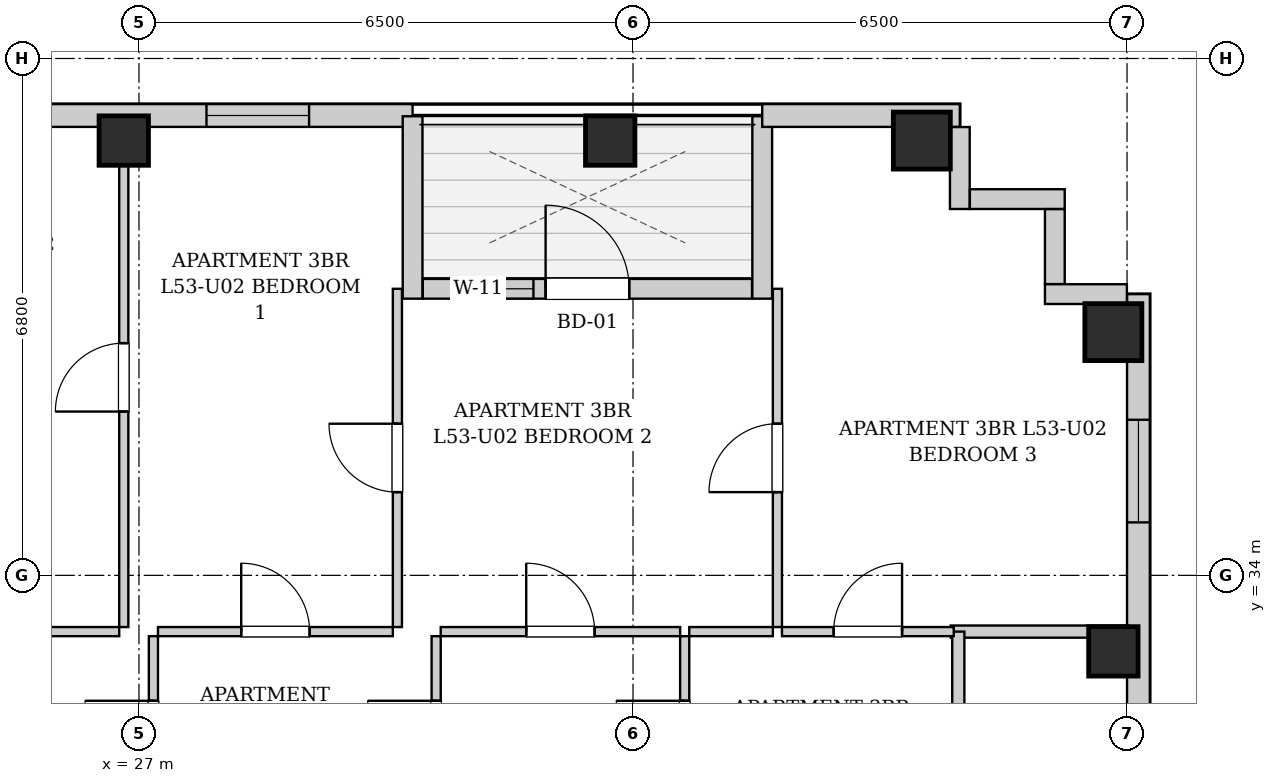
"""IFC4 building model, lengths in metres.
Left out: names, types, materials, properties, quantities, classifications, styles, units other than length and angle.
Written with IfcOpenShell. Run it as: python <this file> out.ifc"""

import sys

from ifc_helpers import new_model, si_unit, direction, frame, frame_2d, origin, origin_2d, place, context, subcontext, project, spatial, rectangle, extrude, element, fill, save


model = new_model("IFC4")
c1 = context("Model", 3, precision=1e-05, world=origin(), true_north=direction((0.0, 1.0)))
c2 = subcontext(c1, "Body", "Model", "MODEL_VIEW")
j1 = project(units=[si_unit("LENGTHUNIT", "METRE"), si_unit("PLANEANGLEUNIT", "RADIAN")], contexts=[c1])
p1 = place(None, origin())
s1 = spatial("IfcSite", under=j1, at=p1, CompositionType="ELEMENT")
p2 = place(p1, origin())
s2 = spatial("IfcBuilding", under=s1, at=p2, CompositionType="ELEMENT")
p3 = place(p2, frame((0.0, 0.0, 184.3)))
s3 = spatial("IfcBuildingStorey", under=s2, at=p3, CompositionType="ELEMENT", Elevation=184.3)
for number, where, z_axis, x_axis in (
    (1, (26.8, 39.72, 0.0), (0.0, 0.0, 1.0), (1.0, 0.0, 0.0)),
    (2, (33.2, 39.72, 0.0), (0.0, 0.0, 1.0), (1.0, 0.0, 0.0)),
):
    element("IfcColumn", number, at=place(p3, frame(where, z_axis=z_axis, x_axis=x_axis)), inside=s3, PredefinedType="COLUMN", context=c2, shape_type="SweptSolid", body=[
        extrude(rectangle(XDim=0.65, YDim=0.65, at=origin_2d()), origin(), (0.0, 0.0, 1.0), 3.3),
    ])
p4 = place(p3, frame((37.3, 39.72, 0.0), z_axis=(0.0, 0.0, 1.0), x_axis=(1.0, 0.0, 0.0)))
e3 = element("IfcColumn", 3, at=p4, inside=s3, PredefinedType="COLUMN", context=c2, shape_type="SweptSolid", body=[
    extrude(rectangle(XDim=0.75, YDim=0.75, at=origin_2d()), origin(), (0.0, 0.0, 1.0), 3.3),
])
p5 = place(p3, frame((39.82, 33.0, 0.0), z_axis=(0.0, 0.0, 1.0), x_axis=(1.0, 0.0, 0.0)))
e4 = element("IfcColumn", 4, at=p5, inside=s3, PredefinedType="COLUMN", context=c2, shape_type="SweptSolid", body=[
    extrude(rectangle(XDim=0.65, YDim=0.65, at=origin_2d()), origin(), (0.0, 0.0, 1.0), 3.3),
])
p6 = place(p3, frame((39.82, 37.2, 0.0), z_axis=(0.0, 0.0, 1.0), x_axis=(1.0, 0.0, 0.0)))
e5 = element("IfcColumn", 5, at=p6, inside=s3, PredefinedType="COLUMN", context=c2, shape_type="SweptSolid", body=[
    extrude(rectangle(XDim=0.75, YDim=0.75, at=origin_2d()), origin(), (0.0, 0.0, 1.0), 3.3),
])
p7 = place(p3, frame((13.1, 40.05, 0.0), z_axis=(0.0, 0.0, 1.0), x_axis=(1.0, 0.0, 0.0)))
e6 = element("IfcWall", 6, at=p7, inside=s3, PredefinedType="SOLIDWALL", context=c2, shape_type="SweptSolid", body=[
    extrude(rectangle(XDim=17.5, YDim=0.3, at=frame_2d((8.75, 0.0))), origin(), (0.0, 0.0, 1.0), 3.04),
])
p8 = place(p7, frame((1.815, 0.0, 0.55)))
e7 = element("IfcOpeningElement", 7, at=p8, cuts=e6, PredefinedType="OPENING", context=c2, shape_type="SweptSolid", body=[
    extrude(rectangle(XDim=1.35, YDim=1.2, at=frame_2d((0.675, 0.6))), frame((0.0, 0.16, 0.0), z_axis=(0.0, -1.0, 0.0), x_axis=(1.0, 0.0, 0.0)), (0.0, 0.0, 1.0), 0.32),
])
p9 = place(p7, frame((6.189, 0.0, 0.55)))
e8 = element("IfcOpeningElement", 8, at=p9, cuts=e6, PredefinedType="OPENING", context=c2, shape_type="SweptSolid", body=[
    extrude(rectangle(XDim=1.35, YDim=1.2, at=frame_2d((0.675, 0.6))), frame((0.0, 0.16, 0.0), z_axis=(0.0, -1.0, 0.0), x_axis=(1.0, 0.0, 0.0)), (0.0, 0.0, 1.0), 0.32),
])
p10 = place(p7, frame((14.788, 0.0, 0.55)))
e9 = element("IfcOpeningElement", 9, at=p10, cuts=e6, PredefinedType="OPENING", context=c2, shape_type="SweptSolid", body=[
    extrude(rectangle(XDim=1.35, YDim=1.2, at=frame_2d((0.675, 0.6))), frame((0.0, 0.16, 0.0), z_axis=(0.0, -1.0, 0.0), x_axis=(1.0, 0.0, 0.0)), (0.0, 0.0, 1.0), 0.32),
])
p11 = place(p3, frame((30.6, 40.04, 0.0), z_axis=(0.0, 0.0, 1.0), x_axis=(0.0, -1.0, 0.0)))
e10 = element("IfcWall", 10, at=p11, inside=s3, PredefinedType="SOLIDWALL", context=c2, shape_type="SweptSolid", body=[
    extrude(rectangle(XDim=2.4, YDim=0.26, at=frame_2d((1.2, 0.0))), origin(), (0.0, 0.0, 1.0), 3.04),
])
p12 = place(p3, frame((30.734, 37.77, 0.0), z_axis=(0.0, 0.0, 1.0), x_axis=(1.0, 0.0, 0.0)))
e11 = element("IfcWall", 11, at=p12, inside=s3, PredefinedType="SOLIDWALL", context=c2, shape_type="SweptSolid", body=[
    extrude(rectangle(XDim=4.332, YDim=0.26, at=frame_2d((2.166, 0.0))), origin(), (0.0, 0.0, 1.0), 3.04),
])
p13 = place(p12, frame((1.616, 0.0, 0.0)))
e12 = element("IfcOpeningElement", 12, at=p13, cuts=e11, PredefinedType="OPENING", context=c2, shape_type="SweptSolid", body=[
    extrude(rectangle(XDim=1.1, YDim=2.0, at=frame_2d((0.55, 1.0))), frame((0.0, 0.14, 0.0), z_axis=(0.0, -1.0, 0.0), x_axis=(1.0, 0.0, 0.0)), (0.0, 0.0, 1.0), 0.28),
])
p14 = place(p12, frame((0.606, 0.0, 0.55)))
e13 = element("IfcOpeningElement", 13, at=p14, cuts=e11, PredefinedType="OPENING", context=c2, shape_type="SweptSolid", body=[
    extrude(rectangle(XDim=0.85, YDim=1.2, at=frame_2d((0.425, 0.6))), frame((0.0, 0.14, 0.0), z_axis=(0.0, -1.0, 0.0), x_axis=(1.0, 0.0, 0.0)), (0.0, 0.0, 1.0), 0.28),
])
p15 = place(p3, frame((35.2, 37.64, 0.0), z_axis=(0.0, 0.0, 1.0), x_axis=(0.0, 1.0, 0.0)))
e14 = element("IfcWall", 14, at=p15, inside=s3, PredefinedType="SOLIDWALL", context=c2, shape_type="SweptSolid", body=[
    extrude(rectangle(XDim=2.4, YDim=0.26, at=frame_2d((1.2, 0.0))), origin(), (0.0, 0.0, 1.0), 3.04),
])
p16 = place(p3, frame((35.2, 40.05, 0.0), z_axis=(0.0, 0.0, 1.0), x_axis=(1.0, 0.0, 0.0)))
e15 = element("IfcWall", 15, at=p16, inside=s3, PredefinedType="SOLIDWALL", context=c2, shape_type="SweptSolid", body=[
    extrude(rectangle(XDim=2.6, YDim=0.3, at=frame_2d((1.3, 0.0))), origin(), (0.0, 0.0, 1.0), 3.04),
])
p17 = place(p3, frame((40.15, 37.7, 0.0), z_axis=(0.0, 0.0, 1.0), x_axis=(0.0, -1.0, 0.0)))
e16 = element("IfcWall", 16, at=p17, inside=s3, PredefinedType="SOLIDWALL", context=c2, shape_type="SweptSolid", body=[
    extrude(rectangle(XDim=31.4, YDim=0.3, at=frame_2d((15.7, 0.0))), origin(), (0.0, 0.0, 1.0), 3.04),
])
p18 = place(p17, frame((28.396, 0.0, 0.55)))
e17 = element("IfcOpeningElement", 17, at=p18, cuts=e16, PredefinedType="OPENING", context=c2, shape_type="SweptSolid", body=[
    extrude(rectangle(XDim=1.35, YDim=1.2, at=frame_2d((0.675, 0.6))), frame((0.0, 0.16, 0.0), z_axis=(0.0, -1.0, 0.0), x_axis=(1.0, 0.0, 0.0)), (0.0, 0.0, 1.0), 0.32),
])
p19 = place(p17, frame((1.653, 0.0, 0.55)))
e18 = element("IfcOpeningElement", 18, at=p19, cuts=e16, PredefinedType="OPENING", context=c2, shape_type="SweptSolid", body=[
    extrude(rectangle(XDim=1.35, YDim=1.2, at=frame_2d((0.675, 0.6))), frame((0.0, 0.16, 0.0), z_axis=(0.0, -1.0, 0.0), x_axis=(1.0, 0.0, 0.0)), (0.0, 0.0, 1.0), 0.32),
])
p20 = place(p17, frame((19.683, 0.0, 0.55)))
e19 = element("IfcOpeningElement", 19, at=p20, cuts=e16, PredefinedType="OPENING", context=c2, shape_type="SweptSolid", body=[
    extrude(rectangle(XDim=1.35, YDim=1.2, at=frame_2d((0.675, 0.6))), frame((0.0, 0.16, 0.0), z_axis=(0.0, -1.0, 0.0), x_axis=(1.0, 0.0, 0.0)), (0.0, 0.0, 1.0), 0.32),
])
p21 = place(p17, frame((10.367, 0.0, 0.55)))
e20 = element("IfcOpeningElement", 20, at=p21, cuts=e16, PredefinedType="OPENING", context=c2, shape_type="SweptSolid", body=[
    extrude(rectangle(XDim=1.35, YDim=1.2, at=frame_2d((0.675, 0.6))), frame((0.0, 0.16, 0.0), z_axis=(0.0, -1.0, 0.0), x_axis=(1.0, 0.0, 0.0)), (0.0, 0.0, 1.0), 0.32),
])
p22 = place(p3, frame((37.8, 39.898, 0.0), z_axis=(0.0, 0.0, 1.0), x_axis=(0.0, -1.0, 0.0)))
e21 = element("IfcWall", 21, at=p22, inside=s3, PredefinedType="SOLIDWALL", context=c2, shape_type="SweptSolid", body=[
    extrude(rectangle(XDim=1.078, YDim=0.26, at=frame_2d((0.539, 0.0))), origin(), (0.0, 0.0, 1.0), 3.04),
])
p23 = place(p3, frame((37.932, 38.95, 0.0), z_axis=(0.0, 0.0, 1.0), x_axis=(1.0, 0.0, 0.0)))
e22 = element("IfcWall", 22, at=p23, inside=s3, PredefinedType="SOLIDWALL", context=c2, shape_type="SweptSolid", body=[
    extrude(rectangle(XDim=1.248, YDim=0.26, at=frame_2d((0.624, 0.0))), origin(), (0.0, 0.0, 1.0), 3.04),
])
p24 = place(p3, frame((39.05, 38.818, 0.0), z_axis=(0.0, 0.0, 1.0), x_axis=(0.0, -1.0, 0.0)))
e23 = element("IfcWall", 23, at=p24, inside=s3, PredefinedType="SOLIDWALL", context=c2, shape_type="SweptSolid", body=[
    extrude(rectangle(XDim=0.986, YDim=0.26, at=frame_2d((0.493, 0.0))), origin(), (0.0, 0.0, 1.0), 3.04),
])
p25 = place(p3, frame((38.92, 37.7, 0.0), z_axis=(0.0, 0.0, 1.0), x_axis=(1.0, 0.0, 0.0)))
e24 = element("IfcWall", 24, at=p25, inside=s3, PredefinedType="SOLIDWALL", context=c2, shape_type="SweptSolid", body=[
    extrude(rectangle(XDim=1.078, YDim=0.26, at=frame_2d((0.539, 0.0))), origin(), (0.0, 0.0, 1.0), 3.04),
])
p26 = place(p3, frame((37.68, 33.26, 0.0), z_axis=(0.0, 0.0, 1.0), x_axis=(1.0, 0.0, 0.0)))
e25 = element("IfcWall", 25, at=p26, inside=s3, PredefinedType="PARTITIONING", context=c2, shape_type="SweptSolid", body=[
    extrude(rectangle(XDim=2.34, YDim=0.16, at=frame_2d((1.17, 0.0))), origin(), (0.0, 0.0, 1.0), 3.04),
])
p27 = place(p3, frame((37.78, 30.6, 0.0), z_axis=(0.0, 0.0, 1.0), x_axis=(0.0, 1.0, 0.0)))
e26 = element("IfcWall", 26, at=p27, inside=s3, PredefinedType="PARTITIONING", context=c2, shape_type="SweptSolid", body=[
    extrude(rectangle(XDim=2.66, YDim=0.16, at=frame_2d((1.33, 0.0))), origin(), (0.0, 0.0, 1.0), 3.04),
])
p28 = place(p3, frame((27.19, 30.6, 0.0), z_axis=(0.0, 0.0, 1.0), x_axis=(0.0, 1.0, 0.0)))
e27 = element("IfcWall", 27, at=p28, inside=s3, PredefinedType="PARTITIONING", context=c2, shape_type="SweptSolid", body=[
    extrude(rectangle(XDim=2.6, YDim=0.12, at=frame_2d((1.3, 0.0))), origin(), (0.0, 0.0, 1.0), 3.04),
])
p29 = place(p28, frame((0.85, 0.0, 0.0)))
e28 = element("IfcOpeningElement", 28, at=p29, cuts=e27, PredefinedType="OPENING", context=c2, shape_type="SweptSolid", body=[
    extrude(rectangle(XDim=0.9, YDim=2.05, at=frame_2d((0.45, 1.025))), frame((0.0, 0.07, 0.0), z_axis=(0.0, -1.0, 0.0), x_axis=(1.0, 0.0, 0.0)), (0.0, 0.0, 1.0), 0.14),
])
p30 = place(p3, frame((23.98, 33.26, 0.0), z_axis=(0.0, 0.0, 1.0), x_axis=(1.0, 0.0, 0.0)))
e29 = element("IfcWall", 29, at=p30, inside=s3, PredefinedType="PARTITIONING", context=c2, shape_type="SweptSolid", body=[
    extrude(rectangle(XDim=2.76, YDim=0.12, at=frame_2d((1.38, 0.0))), origin(), (0.0, 0.0, 1.0), 3.04),
])
p31 = place(p30, frame((0.93, 0.0, 0.0)))
e30 = element("IfcOpeningElement", 30, at=p31, cuts=e29, PredefinedType="OPENING", context=c2, shape_type="SweptSolid", body=[
    extrude(rectangle(XDim=0.9, YDim=2.05, at=frame_2d((0.45, 1.025))), frame((0.0, 0.07, 0.0), z_axis=(0.0, -1.0, 0.0), x_axis=(1.0, 0.0, 0.0)), (0.0, 0.0, 1.0), 0.14),
])
p32 = place(p3, frame((30.91, 30.6, 0.0), z_axis=(0.0, 0.0, 1.0), x_axis=(0.0, 1.0, 0.0)))
e31 = element("IfcWall", 31, at=p32, inside=s3, PredefinedType="PARTITIONING", context=c2, shape_type="SweptSolid", body=[
    extrude(rectangle(XDim=2.6, YDim=0.12, at=frame_2d((1.3, 0.0))), origin(), (0.0, 0.0, 1.0), 3.04),
])
p33 = place(p32, frame((0.85, 0.0, 0.0)))
e32 = element("IfcOpeningElement", 32, at=p33, cuts=e31, PredefinedType="OPENING", context=c2, shape_type="SweptSolid", body=[
    extrude(rectangle(XDim=0.9, YDim=2.05, at=frame_2d((0.45, 1.025))), frame((0.0, 0.07, 0.0), z_axis=(0.0, -1.0, 0.0), x_axis=(1.0, 0.0, 0.0)), (0.0, 0.0, 1.0), 0.14),
])
p34 = place(p3, frame((27.25, 33.26, 0.0), z_axis=(0.0, 0.0, 1.0), x_axis=(1.0, 0.0, 0.0)))
e33 = element("IfcWall", 33, at=p34, inside=s3, PredefinedType="PARTITIONING", context=c2, shape_type="SweptSolid", body=[
    extrude(rectangle(XDim=3.09, YDim=0.12, at=frame_2d((1.545, 0.0))), origin(), (0.0, 0.0, 1.0), 3.04),
])
p35 = place(p34, frame((1.095, 0.0, 0.0)))
e34 = element("IfcOpeningElement", 34, at=p35, cuts=e33, PredefinedType="OPENING", context=c2, shape_type="SweptSolid", body=[
    extrude(rectangle(XDim=0.9, YDim=2.05, at=frame_2d((0.45, 1.025))), frame((0.0, 0.07, 0.0), z_axis=(0.0, -1.0, 0.0), x_axis=(1.0, 0.0, 0.0)), (0.0, 0.0, 1.0), 0.14),
])
p36 = place(p3, frame((34.18, 30.6, 0.0), z_axis=(0.0, 0.0, 1.0), x_axis=(0.0, 1.0, 0.0)))
e35 = element("IfcWall", 35, at=p36, inside=s3, PredefinedType="PARTITIONING", context=c2, shape_type="SweptSolid", body=[
    extrude(rectangle(XDim=2.6, YDim=0.12, at=frame_2d((1.3, 0.0))), origin(), (0.0, 0.0, 1.0), 3.04),
])
p37 = place(p36, frame((0.85, 0.0, 0.0)))
e36 = element("IfcOpeningElement", 36, at=p37, cuts=e35, PredefinedType="OPENING", context=c2, shape_type="SweptSolid", body=[
    extrude(rectangle(XDim=0.9, YDim=2.05, at=frame_2d((0.45, 1.025))), frame((0.0, 0.07, 0.0), z_axis=(0.0, -1.0, 0.0), x_axis=(1.0, 0.0, 0.0)), (0.0, 0.0, 1.0), 0.14),
])
p38 = place(p3, frame((30.97, 33.26, 0.0), z_axis=(0.0, 0.0, 1.0), x_axis=(1.0, 0.0, 0.0)))
e37 = element("IfcWall", 37, at=p38, inside=s3, PredefinedType="PARTITIONING", context=c2, shape_type="SweptSolid", body=[
    extrude(rectangle(XDim=3.15, YDim=0.12, at=frame_2d((1.575, 0.0))), origin(), (0.0, 0.0, 1.0), 3.04),
])
p39 = place(p38, frame((1.125, 0.0, 0.0)))
e38 = element("IfcOpeningElement", 38, at=p39, cuts=e37, PredefinedType="OPENING", context=c2, shape_type="SweptSolid", body=[
    extrude(rectangle(XDim=0.9, YDim=2.05, at=frame_2d((0.45, 1.025))), frame((0.0, 0.07, 0.0), z_axis=(0.0, -1.0, 0.0), x_axis=(1.0, 0.0, 0.0)), (0.0, 0.0, 1.0), 0.14),
])
p40 = place(p3, frame((34.24, 33.26, 0.0), z_axis=(0.0, 0.0, 1.0), x_axis=(1.0, 0.0, 0.0)))
e39 = element("IfcWall", 39, at=p40, inside=s3, PredefinedType="PARTITIONING", context=c2, shape_type="SweptSolid", body=[
    extrude(rectangle(XDim=1.1, YDim=0.12, at=frame_2d((0.55, 0.0))), origin(), (0.0, 0.0, 1.0), 3.04),
])
p41 = place(p3, frame((35.46, 33.26, 0.0), z_axis=(0.0, 0.0, 1.0), x_axis=(1.0, 0.0, 0.0)))
e40 = element("IfcWall", 40, at=p41, inside=s3, PredefinedType="PARTITIONING", context=c2, shape_type="SweptSolid", body=[
    extrude(rectangle(XDim=2.26, YDim=0.12, at=frame_2d((1.13, 0.0))), origin(), (0.0, 0.0, 1.0), 3.04),
])
p42 = place(p41, frame((0.68, 0.0, 0.0)))
e41 = element("IfcOpeningElement", 41, at=p42, cuts=e40, PredefinedType="OPENING", context=c2, shape_type="SweptSolid", body=[
    extrude(rectangle(XDim=0.9, YDim=2.05, at=frame_2d((0.45, 1.025))), frame((0.0, 0.07, 0.0), z_axis=(0.0, -1.0, 0.0), x_axis=(1.0, 0.0, 0.0)), (0.0, 0.0, 1.0), 0.14),
])
p43 = place(p3, frame((26.8, 33.32, 0.0), z_axis=(0.0, 0.0, 1.0), x_axis=(0.0, 1.0, 0.0)))
e42 = element("IfcWall", 42, at=p43, inside=s3, PredefinedType="PARTITIONING", context=c2, shape_type="SweptSolid", body=[
    extrude(rectangle(XDim=6.6, YDim=0.12, at=frame_2d((3.3, 0.0))), origin(), (0.0, 0.0, 1.0), 3.04),
])
p44 = place(p43, frame((2.835, 0.0, 0.0)))
e43 = element("IfcOpeningElement", 43, at=p44, cuts=e42, PredefinedType="OPENING", context=c2, shape_type="SweptSolid", body=[
    extrude(rectangle(XDim=0.9, YDim=2.05, at=frame_2d((0.45, 1.025))), frame((0.0, 0.07, 0.0), z_axis=(0.0, -1.0, 0.0), x_axis=(1.0, 0.0, 0.0)), (0.0, 0.0, 1.0), 0.14),
])
p45 = place(p3, frame((30.4, 33.32, 0.0), z_axis=(0.0, 0.0, 1.0), x_axis=(0.0, 1.0, 0.0)))
e44 = element("IfcWall", 44, at=p45, inside=s3, PredefinedType="PARTITIONING", context=c2, shape_type="SweptSolid", body=[
    extrude(rectangle(XDim=4.45, YDim=0.12, at=frame_2d((2.225, 0.0))), origin(), (0.0, 0.0, 1.0), 3.04),
])
p46 = place(p45, frame((1.775, 0.0, 0.0)))
e45 = element("IfcOpeningElement", 45, at=p46, cuts=e44, PredefinedType="OPENING", context=c2, shape_type="SweptSolid", body=[
    extrude(rectangle(XDim=0.9, YDim=2.05, at=frame_2d((0.45, 1.025))), frame((0.0, 0.07, 0.0), z_axis=(0.0, -1.0, 0.0), x_axis=(1.0, 0.0, 0.0)), (0.0, 0.0, 1.0), 0.14),
])
p47 = place(p3, frame((35.4, 33.32, 0.0), z_axis=(0.0, 0.0, 1.0), x_axis=(0.0, 1.0, 0.0)))
e46 = element("IfcWall", 46, at=p47, inside=s3, PredefinedType="PARTITIONING", context=c2, shape_type="SweptSolid", body=[
    extrude(rectangle(XDim=4.45, YDim=0.12, at=frame_2d((2.225, 0.0))), origin(), (0.0, 0.0, 1.0), 3.04),
])
p48 = place(p47, frame((1.775, 0.0, 0.0)))
e47 = element("IfcOpeningElement", 47, at=p48, cuts=e46, PredefinedType="OPENING", context=c2, shape_type="SweptSolid", body=[
    extrude(rectangle(XDim=0.9, YDim=2.05, at=frame_2d((0.45, 1.025))), frame((0.0, 0.07, 0.0), z_axis=(0.0, -1.0, 0.0), x_axis=(1.0, 0.0, 0.0)), (0.0, 0.0, 1.0), 0.14),
])
p49 = place(p29, origin())
e48 = element("IfcDoor", 48, at=p49, inside=s3, OperationType="SINGLE_SWING_RIGHT", PredefinedType="DOOR", context=c2, shape_type="SweptSolid", body=[
    extrude(rectangle(XDim=0.9, YDim=2.05, at=frame_2d((0.45, 1.025))), frame((0.0, 0.025, 0.0), z_axis=(0.0, -1.0, 0.0), x_axis=(1.0, 0.0, 0.0)), (0.0, 0.0, 1.0), 0.05),
])
fill(e28, e48)
p50 = place(p33, origin())
e49 = element("IfcDoor", 49, at=p50, inside=s3, OperationType="SINGLE_SWING_RIGHT", PredefinedType="DOOR", context=c2, shape_type="SweptSolid", body=[
    extrude(rectangle(XDim=0.9, YDim=2.05, at=frame_2d((0.45, 1.025))), frame((0.0, 0.025, 0.0), z_axis=(0.0, -1.0, 0.0), x_axis=(1.0, 0.0, 0.0)), (0.0, 0.0, 1.0), 0.05),
])
fill(e32, e49)
p51 = place(p35, origin())
e50 = element("IfcDoor", 50, at=p51, inside=s3, OperationType="SINGLE_SWING_LEFT", PredefinedType="DOOR", context=c2, shape_type="SweptSolid", body=[
    extrude(rectangle(XDim=0.9, YDim=2.05, at=frame_2d((0.45, 1.025))), frame((0.0, 0.025, 0.0), z_axis=(0.0, -1.0, 0.0), x_axis=(1.0, 0.0, 0.0)), (0.0, 0.0, 1.0), 0.05),
])
fill(e34, e50)
p52 = place(p37, origin())
e51 = element("IfcDoor", 51, at=p52, inside=s3, OperationType="SINGLE_SWING_RIGHT", PredefinedType="DOOR", context=c2, shape_type="SweptSolid", body=[
    extrude(rectangle(XDim=0.9, YDim=2.05, at=frame_2d((0.45, 1.025))), frame((0.0, 0.025, 0.0), z_axis=(0.0, -1.0, 0.0), x_axis=(1.0, 0.0, 0.0)), (0.0, 0.0, 1.0), 0.05),
])
fill(e36, e51)
p53 = place(p39, origin())
e52 = element("IfcDoor", 52, at=p53, inside=s3, OperationType="SINGLE_SWING_LEFT", PredefinedType="DOOR", context=c2, shape_type="SweptSolid", body=[
    extrude(rectangle(XDim=0.9, YDim=2.05, at=frame_2d((0.45, 1.025))), frame((0.0, 0.025, 0.0), z_axis=(0.0, -1.0, 0.0), x_axis=(1.0, 0.0, 0.0)), (0.0, 0.0, 1.0), 0.05),
])
fill(e38, e52)
p54 = place(p42, origin())
e53 = element("IfcDoor", 53, at=p54, inside=s3, OperationType="SINGLE_SWING_RIGHT", PredefinedType="DOOR", context=c2, shape_type="SweptSolid", body=[
    extrude(rectangle(XDim=0.9, YDim=2.05, at=frame_2d((0.45, 1.025))), frame((0.0, 0.025, 0.0), z_axis=(0.0, -1.0, 0.0), x_axis=(1.0, 0.0, 0.0)), (0.0, 0.0, 1.0), 0.05),
])
fill(e41, e53)
p55 = place(p44, origin())
e54 = element("IfcDoor", 54, at=p55, inside=s3, OperationType="SINGLE_SWING_LEFT", PredefinedType="DOOR", context=c2, shape_type="SweptSolid", body=[
    extrude(rectangle(XDim=0.9, YDim=2.05, at=frame_2d((0.45, 1.025))), frame((0.0, 0.025, 0.0), z_axis=(0.0, -1.0, 0.0), x_axis=(1.0, 0.0, 0.0)), (0.0, 0.0, 1.0), 0.05),
])
fill(e43, e54)
p56 = place(p46, origin())
e55 = element("IfcDoor", 55, at=p56, inside=s3, OperationType="SINGLE_SWING_RIGHT", PredefinedType="DOOR", context=c2, shape_type="SweptSolid", body=[
    extrude(rectangle(XDim=0.9, YDim=2.05, at=frame_2d((0.45, 1.025))), frame((0.0, 0.025, 0.0), z_axis=(0.0, -1.0, 0.0), x_axis=(1.0, 0.0, 0.0)), (0.0, 0.0, 1.0), 0.05),
])
fill(e45, e55)
p57 = place(p48, origin())
e56 = element("IfcDoor", 56, at=p57, inside=s3, OperationType="SINGLE_SWING_LEFT", PredefinedType="DOOR", context=c2, shape_type="SweptSolid", body=[
    extrude(rectangle(XDim=0.9, YDim=2.05, at=frame_2d((0.45, 1.025))), frame((0.0, 0.025, 0.0), z_axis=(0.0, -1.0, 0.0), x_axis=(1.0, 0.0, 0.0)), (0.0, 0.0, 1.0), 0.05),
])
fill(e47, e56)
p58 = place(p13, origin())
e57 = element("IfcDoor", 57, at=p58, inside=s3, OperationType="SINGLE_SWING_LEFT", PredefinedType="DOOR", context=c2, shape_type="SweptSolid", body=[
    extrude(rectangle(XDim=1.1, YDim=2.0, at=frame_2d((0.55, 1.0))), frame((0.0, 0.025, 0.0), z_axis=(0.0, -1.0, 0.0), x_axis=(1.0, 0.0, 0.0)), (0.0, 0.0, 1.0), 0.05),
])
fill(e12, e57)
p59 = place(p10, origin())
e58 = element("IfcWindow", 58, at=p59, inside=s3, PartitioningType="SINGLE_PANEL", PredefinedType="WINDOW", context=c2, shape_type="SweptSolid", body=[
    extrude(rectangle(XDim=1.35, YDim=1.2, at=frame_2d((0.675, 0.6))), frame((0.0, 0.03, 0.0), z_axis=(0.0, -1.0, 0.0), x_axis=(1.0, 0.0, 0.0)), (0.0, 0.0, 1.0), 0.06),
])
fill(e9, e58)
p60 = place(p14, origin())
e59 = element("IfcWindow", 59, at=p60, inside=s3, PartitioningType="SINGLE_PANEL", PredefinedType="WINDOW", context=c2, shape_type="SweptSolid", body=[
    extrude(rectangle(XDim=0.85, YDim=1.2, at=frame_2d((0.425, 0.6))), frame((0.0, 0.03, 0.0), z_axis=(0.0, -1.0, 0.0), x_axis=(1.0, 0.0, 0.0)), (0.0, 0.0, 1.0), 0.06),
])
fill(e13, e59)
p61 = place(p19, origin())
e60 = element("IfcWindow", 60, at=p61, inside=s3, PartitioningType="SINGLE_PANEL", PredefinedType="WINDOW", context=c2, shape_type="SweptSolid", body=[
    extrude(rectangle(XDim=1.35, YDim=1.2, at=frame_2d((0.675, 0.6))), frame((0.0, 0.03, 0.0), z_axis=(0.0, -1.0, 0.0), x_axis=(1.0, 0.0, 0.0)), (0.0, 0.0, 1.0), 0.06),
])
fill(e18, e60)
save(model, sys.argv[1])
